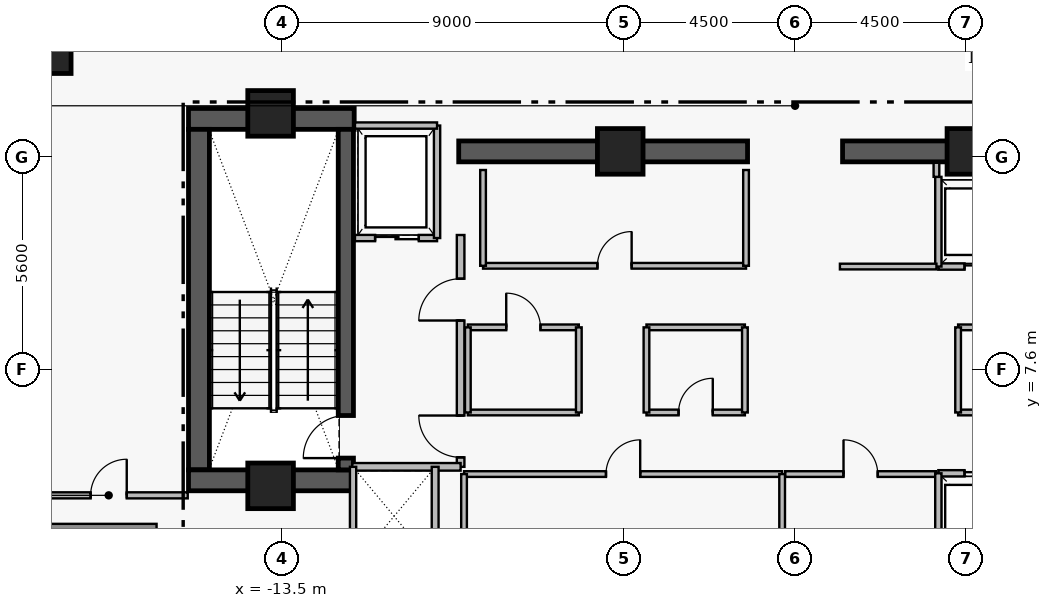
"""IFC4 building model, lengths in metres.
Left out: names, types, materials, properties, quantities, classifications, styles, units other than length and angle.
Written with IfcOpenShell. Run it as: python <this file> out.ifc"""

import sys

from ifc_helpers import new_model, si_unit, direction, frame, frame_2d, origin, origin_2d, place, context, subcontext, project, spatial, rectangle, extrude, element, fill, save


model = new_model("IFC4")
c1 = context("Model", 3, precision=1e-05, world=origin(), true_north=direction((0.0, 1.0)))
c2 = subcontext(c1, "Body", "Model", "MODEL_VIEW")
j1 = project(units=[si_unit("LENGTHUNIT", "METRE"), si_unit("PLANEANGLEUNIT", "RADIAN")], contexts=[c1])
p1 = place(None, origin())
s1 = spatial("IfcSite", under=j1, at=p1, CompositionType="ELEMENT")
p2 = place(p1, origin())
s2 = spatial("IfcBuilding", under=s1, at=p2, CompositionType="ELEMENT")
p3 = place(p2, frame((0.0, 0.0, 243.35)))
s3 = spatial("IfcBuildingStorey", under=s2, at=p3, CompositionType="ELEMENT", Elevation=243.35)
p4 = place(p3, frame((-15.96, 14.205, 0.0), z_axis=(0.0, 0.0, 1.0), x_axis=(1.0, 0.0, 0.0)))
e1 = element("IfcWall", 1, at=p4, inside=s3, PredefinedType="SHEAR", context=c2, shape_type="SweptSolid", body=[
    extrude(rectangle(XDim=4.36, YDim=0.55, at=frame_2d((2.18, 0.0))), origin(), (0.0, 0.0, 1.0), 3.51),
])
p5 = place(p3, frame((-15.685, 4.97, 0.0), z_axis=(0.0, 0.0, 1.0), x_axis=(0.0, 1.0, 0.0)))
e2 = element("IfcWall", 2, at=p5, inside=s3, PredefinedType="SHEAR", context=c2, shape_type="SweptSolid", body=[
    extrude(rectangle(XDim=8.96, YDim=0.55, at=frame_2d((4.48, 0.0))), origin(), (0.0, 0.0, 1.0), 3.51),
])
p6 = place(p3, frame((-15.96, 4.695, 0.0), z_axis=(0.0, 0.0, 1.0), x_axis=(1.0, 0.0, 0.0)))
e3 = element("IfcWall", 3, at=p6, inside=s3, PredefinedType="SHEAR", context=c2, shape_type="SweptSolid", body=[
    extrude(rectangle(XDim=4.36, YDim=0.55, at=frame_2d((2.18, 0.0))), origin(), (0.0, 0.0, 1.0), 3.51),
])
for number, where, z_axis, x_axis in (
    (4, (-8.85, 13.35, 0.0), (0.0, 0.0, 1.0), (1.0, 0.0, 0.0)),
    (5, (1.25, 13.35, 0.0), (0.0, 0.0, 1.0), (1.0, 0.0, 0.0)),
):
    element("IfcWall", number, at=place(p3, frame(where, z_axis=z_axis, x_axis=x_axis)), inside=s3, PredefinedType="SHEAR", context=c2, shape_type="SweptSolid", body=[
        extrude(rectangle(XDim=7.6, YDim=0.55, at=frame_2d((3.8, 0.0))), origin(), (0.0, 0.0, 1.0), 3.48),
    ])
p7 = place(p3, frame((-11.82, 4.97, 0.0), z_axis=(0.0, 0.0, 1.0), x_axis=(0.0, 1.0, 0.0)))
e6 = element("IfcWall", 6, at=p7, inside=s3, PredefinedType="SHEAR", context=c2, shape_type="SweptSolid", body=[
    extrude(rectangle(XDim=8.96, YDim=0.4, at=frame_2d((4.48, 0.0))), origin(), (0.0, 0.0, 1.0), 3.51),
])
p8 = place(p7, frame((0.31, 0.0, 0.0)))
e7 = element("IfcOpeningElement", 7, at=p8, cuts=e6, PredefinedType="OPENING", context=c2, shape_type="SweptSolid", body=[
    extrude(rectangle(XDim=1.12, YDim=2.22, at=frame_2d((0.56, 1.11))), frame((0.0, 0.21, 0.0), z_axis=(0.0, -1.0, 0.0), x_axis=(1.0, 0.0, 0.0)), (0.0, 0.0, 1.0), 0.42),
])
for number, where, z_axis, x_axis in (
    (8, (-13.8, 14.35, 0.0), (0.0, 0.0, 1.0), (1.0, 0.0, 0.0)),
    (9, (-4.6, 13.35, 0.0), (0.0, 0.0, 1.0), (1.0, 0.0, 0.0)),
    (10, (4.6, 13.35, 0.0), (0.0, 0.0, 1.0), (1.0, 0.0, 0.0)),
    (11, (-13.8, 4.55, 0.0), (0.0, 0.0, 1.0), (1.0, 0.0, 0.0)),
):
    element("IfcColumn", number, at=place(p3, frame(where, z_axis=z_axis, x_axis=x_axis)), inside=s3, PredefinedType="COLUMN", context=c2, shape_type="SweptSolid", body=[
        extrude(rectangle(XDim=1.2, YDim=1.2, at=origin_2d()), origin(), (0.0, 0.0, 1.0), 3.7),
    ])
p9 = place(p3, frame((-19.55, 15.9, 0.0), z_axis=(0.0, 0.0, 1.0), x_axis=(1.0, 0.0, 0.0)))
e12 = element("IfcColumn", 12, at=p9, inside=s3, PredefinedType="COLUMN", context=c2, shape_type="SweptSolid", body=[
    extrude(rectangle(XDim=1.0, YDim=1.0, at=origin_2d()), origin(), (0.0, 0.0, 1.0), 3.7),
])
p10 = place(p3, frame((-16.8, 3.4, 0.0), z_axis=(0.0, 0.0, 1.0), x_axis=(-1.0, 0.0, 0.0)))
e13 = element("IfcWall", 13, at=p10, inside=s3, PredefinedType="STANDARD", context=c2, shape_type="SweptSolid", body=[
    extrude(rectangle(XDim=3.4, YDim=0.3, at=frame_2d((1.7, 0.0))), origin(), (0.0, 0.0, 1.0), 3.48),
])
p11 = place(p3, frame((-8.8, 5.05, 0.0), z_axis=(0.0, 0.0, 1.0), x_axis=(0.0, 1.0, 0.0)))
e14 = element("IfcWall", 14, at=p11, inside=s3, PredefinedType="PARTITIONING", context=c2, shape_type="SweptSolid", body=[
    extrude(rectangle(XDim=6.1, YDim=0.2, at=frame_2d((3.05, 0.0))), origin(), (0.0, 0.0, 1.0), 3.48),
])
p12 = place(p11, frame((0.25, 0.0, 0.0)))
e15 = element("IfcOpeningElement", 15, at=p12, cuts=e14, PredefinedType="OPENING", context=c2, shape_type="SweptSolid", body=[
    extrude(rectangle(XDim=1.1, YDim=2.2, at=frame_2d((0.55, 1.1))), frame((0.0, 0.11, 0.0), z_axis=(0.0, -1.0, 0.0), x_axis=(1.0, 0.0, 0.0)), (0.0, 0.0, 1.0), 0.22),
])
p13 = place(p11, frame((3.85, 0.0, 0.0)))
e16 = element("IfcOpeningElement", 16, at=p13, cuts=e14, PredefinedType="OPENING", context=c2, shape_type="SweptSolid", body=[
    extrude(rectangle(XDim=1.1, YDim=2.2, at=frame_2d((0.55, 1.1))), frame((0.0, 0.11, 0.0), z_axis=(0.0, -1.0, 0.0), x_axis=(1.0, 0.0, 0.0)), (0.0, 0.0, 1.0), 0.22),
])
p14 = place(p3, frame((-11.58, 11.07, 0.0), z_axis=(0.0, 0.0, 1.0), x_axis=(1.0, 0.0, 0.0)))
e17 = element("IfcWall", 17, at=p14, inside=s3, PredefinedType="PARTITIONING", context=c2, shape_type="SweptSolid", body=[
    extrude(rectangle(XDim=2.16, YDim=0.165, at=frame_2d((1.08, 0.0))), origin(), (0.0, 0.0, 1.0), 3.48),
])
p15 = place(p14, frame((0.53, 0.0, 0.0)))
e18 = element("IfcOpeningElement", 18, at=p15, cuts=e17, PredefinedType="OPENING", context=c2, shape_type="SweptSolid", body=[
    extrude(rectangle(XDim=1.15, YDim=2.25, at=frame_2d((0.575, 1.125))), frame((0.0, 0.093, 0.0), z_axis=(0.0, -1.0, 0.0), x_axis=(1.0, 0.0, 0.0)), (0.0, 0.0, 1.0), 0.185),
])
p16 = place(p3, frame((3.77, 4.88, 0.0), z_axis=(0.0, 0.0, 1.0), x_axis=(1.0, 0.0, 0.0)))
e19 = element("IfcWall", 19, at=p16, inside=s3, PredefinedType="PARTITIONING", context=c2, shape_type="SweptSolid", body=[
    extrude(rectangle(XDim=2.48, YDim=0.165, at=frame_2d((1.24, 0.0))), origin(), (0.0, 0.0, 1.0), 3.48),
])
p17 = place(p16, frame((0.69, 0.0, 0.0)))
e20 = element("IfcOpeningElement", 20, at=p17, cuts=e19, PredefinedType="OPENING", context=c2, shape_type="SweptSolid", body=[
    extrude(rectangle(XDim=1.1, YDim=2.25, at=frame_2d((0.55, 1.125))), frame((0.0, 0.093, 0.0), z_axis=(0.0, -1.0, 0.0), x_axis=(1.0, 0.0, 0.0)), (0.0, 0.0, 1.0), 0.185),
])
p18 = place(p3, frame((3.77, 10.32, 0.0), z_axis=(0.0, 0.0, 1.0), x_axis=(1.0, 0.0, 0.0)))
e21 = element("IfcWall", 21, at=p18, inside=s3, PredefinedType="PARTITIONING", context=c2, shape_type="SweptSolid", body=[
    extrude(rectangle(XDim=2.48, YDim=0.165, at=frame_2d((1.24, 0.0))), origin(), (0.0, 0.0, 1.0), 3.48),
])
p19 = place(p18, frame((0.69, 0.0, 0.0)))
e22 = element("IfcOpeningElement", 22, at=p19, cuts=e21, PredefinedType="OPENING", context=c2, shape_type="SweptSolid", body=[
    extrude(rectangle(XDim=1.1, YDim=2.25, at=frame_2d((0.55, 1.125))), frame((0.0, 0.093, 0.0), z_axis=(0.0, -1.0, 0.0), x_axis=(1.0, 0.0, 0.0)), (0.0, 0.0, 1.0), 0.185),
])
p20 = place(p3, frame((-8.71, 4.86, 0.0), z_axis=(0.0, 0.0, 1.0), x_axis=(1.0, 0.0, 0.0)))
e23 = element("IfcWall", 23, at=p20, inside=s3, PredefinedType="PARTITIONING", context=c2, shape_type="SweptSolid", body=[
    extrude(rectangle(XDim=8.37, YDim=0.15, at=frame_2d((4.185, 0.0))), origin(), (0.0, 0.0, 1.0), 3.48),
])
p21 = place(p20, frame((3.735, 0.0, 0.0)))
e24 = element("IfcOpeningElement", 24, at=p21, cuts=e23, PredefinedType="OPENING", context=c2, shape_type="SweptSolid", body=[
    extrude(rectangle(XDim=0.9, YDim=2.15, at=frame_2d((0.45, 1.075))), frame((0.0, 0.085, 0.0), z_axis=(0.0, -1.0, 0.0), x_axis=(1.0, 0.0, 0.0)), (0.0, 0.0, 1.0), 0.17),
])
p22 = place(p3, frame((-0.26, 4.86, 0.0), z_axis=(0.0, 0.0, 1.0), x_axis=(1.0, 0.0, 0.0)))
e25 = element("IfcWall", 25, at=p22, inside=s3, PredefinedType="PARTITIONING", context=c2, shape_type="SweptSolid", body=[
    extrude(rectangle(XDim=3.97, YDim=0.15, at=frame_2d((1.985, 0.0))), origin(), (0.0, 0.0, 1.0), 3.48),
])
p23 = place(p22, frame((1.535, 0.0, 0.0)))
e26 = element("IfcOpeningElement", 26, at=p23, cuts=e25, PredefinedType="OPENING", context=c2, shape_type="SweptSolid", body=[
    extrude(rectangle(XDim=0.9, YDim=2.15, at=frame_2d((0.45, 1.075))), frame((0.0, 0.085, 0.0), z_axis=(0.0, -1.0, 0.0), x_axis=(1.0, 0.0, 0.0)), (0.0, 0.0, 1.0), 0.17),
])
p24 = place(p3, frame((-8.21, 10.34, 0.0), z_axis=(0.0, 0.0, 1.0), x_axis=(1.0, 0.0, 0.0)))
e27 = element("IfcWall", 27, at=p24, inside=s3, PredefinedType="PARTITIONING", context=c2, shape_type="SweptSolid", body=[
    extrude(rectangle(XDim=6.92, YDim=0.15, at=frame_2d((3.46, 0.0))), origin(), (0.0, 0.0, 1.0), 3.48),
])
p25 = place(p24, frame((3.01, 0.0, 0.0)))
e28 = element("IfcOpeningElement", 28, at=p25, cuts=e27, PredefinedType="OPENING", context=c2, shape_type="SweptSolid", body=[
    extrude(rectangle(XDim=0.9, YDim=2.15, at=frame_2d((0.45, 1.075))), frame((0.0, 0.085, 0.0), z_axis=(0.0, -1.0, 0.0), x_axis=(1.0, 0.0, 0.0)), (0.0, 0.0, 1.0), 0.17),
])
p26 = place(p3, frame((-8.61, 8.72, 0.0), z_axis=(0.0, 0.0, 1.0), x_axis=(1.0, 0.0, 0.0)))
e29 = element("IfcWall", 29, at=p26, inside=s3, PredefinedType="PARTITIONING", context=c2, shape_type="SweptSolid", body=[
    extrude(rectangle(XDim=2.92, YDim=0.15, at=frame_2d((1.46, 0.0))), origin(), (0.0, 0.0, 1.0), 3.48),
])
p27 = place(p26, frame((1.01, 0.0, 0.0)))
e30 = element("IfcOpeningElement", 30, at=p27, cuts=e29, PredefinedType="OPENING", context=c2, shape_type="SweptSolid", body=[
    extrude(rectangle(XDim=0.9, YDim=2.15, at=frame_2d((0.45, 1.075))), frame((0.0, 0.085, 0.0), z_axis=(0.0, -1.0, 0.0), x_axis=(1.0, 0.0, 0.0)), (0.0, 0.0, 1.0), 0.17),
])
p28 = place(p3, frame((-3.91, 6.48, 0.0), z_axis=(0.0, 0.0, 1.0), x_axis=(1.0, 0.0, 0.0)))
e31 = element("IfcWall", 31, at=p28, inside=s3, PredefinedType="PARTITIONING", context=c2, shape_type="SweptSolid", body=[
    extrude(rectangle(XDim=2.59, YDim=0.15, at=frame_2d((1.295, 0.0))), origin(), (0.0, 0.0, 1.0), 3.48),
])
p29 = place(p28, frame((0.845, 0.0, 0.0)))
e32 = element("IfcOpeningElement", 32, at=p29, cuts=e31, PredefinedType="OPENING", context=c2, shape_type="SweptSolid", body=[
    extrude(rectangle(XDim=0.9, YDim=2.15, at=frame_2d((0.45, 1.075))), frame((0.0, 0.085, 0.0), z_axis=(0.0, -1.0, 0.0), x_axis=(1.0, 0.0, 0.0)), (0.0, 0.0, 1.0), 0.17),
])
p30 = place(p3, frame((4.29, 6.48, 0.0), z_axis=(0.0, 0.0, 1.0), x_axis=(1.0, 0.0, 0.0)))
e33 = element("IfcWall", 33, at=p30, inside=s3, PredefinedType="PARTITIONING", context=c2, shape_type="SweptSolid", body=[
    extrude(rectangle(XDim=4.32, YDim=0.15, at=frame_2d((2.16, 0.0))), origin(), (0.0, 0.0, 1.0), 3.48),
])
p31 = place(p30, frame((1.71, 0.0, 0.0)))
e34 = element("IfcOpeningElement", 34, at=p31, cuts=e33, PredefinedType="OPENING", context=c2, shape_type="SweptSolid", body=[
    extrude(rectangle(XDim=0.9, YDim=2.15, at=frame_2d((0.45, 1.075))), frame((0.0, 0.085, 0.0), z_axis=(0.0, -1.0, 0.0), x_axis=(1.0, 0.0, 0.0)), (0.0, 0.0, 1.0), 0.17),
])
p32 = place(p3, frame((-20.14, 4.3, 0.0), z_axis=(0.0, 0.0, 1.0), x_axis=(1.0, 0.0, 0.0)))
e35 = element("IfcWall", 35, at=p32, inside=s3, PredefinedType="PARTITIONING", context=c2, shape_type="SweptSolid", body=[
    extrude(rectangle(XDim=4.16, YDim=0.16, at=frame_2d((2.08, 0.0))), origin(), (0.0, 0.0, 1.0), 3.48),
])
p33 = place(p32, frame((1.605, 0.0, 0.0)))
e36 = element("IfcOpeningElement", 36, at=p33, cuts=e35, PredefinedType="OPENING", context=c2, shape_type="SweptSolid", body=[
    extrude(rectangle(XDim=0.95, YDim=2.15, at=frame_2d((0.475, 1.075))), frame((0.0, 0.09, 0.0), z_axis=(0.0, -1.0, 0.0), x_axis=(1.0, 0.0, 0.0)), (0.0, 0.0, 1.0), 0.18),
])
p34 = place(p3, frame((-11.65, 5.05, 0.0), z_axis=(0.0, 0.0, 1.0), x_axis=(1.0, 0.0, 0.0)))
e37 = element("IfcWall", 37, at=p34, inside=s3, PredefinedType="PARTITIONING", context=c2, shape_type="SweptSolid", body=[
    extrude(rectangle(XDim=2.85, YDim=0.2, at=frame_2d((1.425, 0.0))), origin(), (0.0, 0.0, 1.0), 3.48),
])
p35 = place(p3, frame((-9.42, 11.07, 0.0), z_axis=(0.0, 0.0, 1.0), x_axis=(0.0, 1.0, 0.0)))
e38 = element("IfcWall", 38, at=p35, inside=s3, PredefinedType="PARTITIONING", context=c2, shape_type="SweptSolid", body=[
    extrude(rectangle(XDim=2.96, YDim=0.165, at=frame_2d((1.48, 0.0))), origin(), (0.0, 0.0, 1.0), 3.48),
])
p36 = place(p3, frame((-11.58, 14.03, 0.0), z_axis=(0.0, 0.0, 1.0), x_axis=(1.0, 0.0, 0.0)))
e39 = element("IfcWall", 39, at=p36, inside=s3, PredefinedType="PARTITIONING", context=c2, shape_type="SweptSolid", body=[
    extrude(rectangle(XDim=2.16, YDim=0.165, at=frame_2d((1.08, 0.0))), origin(), (0.0, 0.0, 1.0), 3.48),
])
for number, where, z_axis, x_axis in (
    (40, (3.77, 2.52, 0.0), (0.0, 0.0, 1.0), (0.0, 1.0, 0.0)),
    (41, (3.77, 10.32, 0.0), (0.0, 0.0, 1.0), (0.0, 1.0, 0.0)),
):
    element("IfcWall", number, at=place(p3, frame(where, z_axis=z_axis, x_axis=x_axis)), inside=s3, PredefinedType="PARTITIONING", context=c2, shape_type="SweptSolid", body=[
        extrude(rectangle(XDim=2.36, YDim=0.165, at=frame_2d((1.18, 0.0))), origin(), (0.0, 0.0, 1.0), 3.48),
    ])
for number, where, z_axis, x_axis in (
    (42, (-8.71, 2.49, 0.0), (0.0, 0.0, 1.0), (0.0, 1.0, 0.0)),
    (43, (-0.34, 2.49, 0.0), (0.0, 0.0, 1.0), (0.0, 1.0, 0.0)),
):
    element("IfcWall", number, at=place(p3, frame(where, z_axis=z_axis, x_axis=x_axis)), inside=s3, PredefinedType="PARTITIONING", context=c2, shape_type="SweptSolid", body=[
        extrude(rectangle(XDim=2.37, YDim=0.15, at=frame_2d((1.185, 0.0))), origin(), (0.0, 0.0, 1.0), 3.48),
    ])
for number, where, z_axis, x_axis in (
    (44, (-8.21, 10.34, 0.0), (0.0, 0.0, 1.0), (0.0, 1.0, 0.0)),
    (45, (-1.29, 10.34, 0.0), (0.0, 0.0, 1.0), (0.0, 1.0, 0.0)),
):
    element("IfcWall", number, at=place(p3, frame(where, z_axis=z_axis, x_axis=x_axis)), inside=s3, PredefinedType="PARTITIONING", context=c2, shape_type="SweptSolid", body=[
        extrude(rectangle(XDim=2.52, YDim=0.15, at=frame_2d((1.26, 0.0))), origin(), (0.0, 0.0, 1.0), 3.48),
    ])
p37 = place(p3, frame((-9.47, 2.45, 0.0), z_axis=(0.0, 0.0, 1.0), x_axis=(0.0, 1.0, 0.0)))
e46 = element("IfcWall", 46, at=p37, inside=s3, PredefinedType="PARTITIONING", context=c2, shape_type="SweptSolid", body=[
    extrude(rectangle(XDim=2.6, YDim=0.18, at=frame_2d((1.3, 0.0))), origin(), (0.0, 0.0, 1.0), 3.48),
])
p38 = place(p3, frame((-11.63, 2.47, 0.0), z_axis=(0.0, 0.0, 1.0), x_axis=(0.0, 1.0, 0.0)))
e47 = element("IfcWall", 47, at=p38, inside=s3, PredefinedType="PARTITIONING", context=c2, shape_type="SweptSolid", body=[
    extrude(rectangle(XDim=2.58, YDim=0.165, at=frame_2d((1.29, 0.0))), origin(), (0.0, 0.0, 1.0), 3.48),
])
p39 = place(p3, frame((-8.61, 6.48, 0.0), z_axis=(0.0, 0.0, 1.0), x_axis=(1.0, 0.0, 0.0)))
e48 = element("IfcWall", 48, at=p39, inside=s3, PredefinedType="PARTITIONING", context=c2, shape_type="SweptSolid", body=[
    extrude(rectangle(XDim=2.92, YDim=0.15, at=frame_2d((1.46, 0.0))), origin(), (0.0, 0.0, 1.0), 3.48),
])
for number, where, z_axis, x_axis in (
    (49, (-8.61, 6.48, 0.0), (0.0, 0.0, 1.0), (0.0, 1.0, 0.0)),
    (50, (-5.69, 6.48, 0.0), (0.0, 0.0, 1.0), (0.0, 1.0, 0.0)),
):
    element("IfcWall", number, at=place(p3, frame(where, z_axis=z_axis, x_axis=x_axis)), inside=s3, PredefinedType="PARTITIONING", context=c2, shape_type="SweptSolid", body=[
        extrude(rectangle(XDim=2.24, YDim=0.15, at=frame_2d((1.12, 0.0))), origin(), (0.0, 0.0, 1.0), 3.48),
    ])
p40 = place(p3, frame((-3.91, 8.72, 0.0), z_axis=(0.0, 0.0, 1.0), x_axis=(1.0, 0.0, 0.0)))
e51 = element("IfcWall", 51, at=p40, inside=s3, PredefinedType="PARTITIONING", context=c2, shape_type="SweptSolid", body=[
    extrude(rectangle(XDim=2.59, YDim=0.15, at=frame_2d((1.295, 0.0))), origin(), (0.0, 0.0, 1.0), 3.48),
])
for number, where, z_axis, x_axis in (
    (52, (-3.91, 6.48, 0.0), (0.0, 0.0, 1.0), (0.0, 1.0, 0.0)),
    (53, (-1.32, 6.48, 0.0), (0.0, 0.0, 1.0), (0.0, 1.0, 0.0)),
):
    element("IfcWall", number, at=place(p3, frame(where, z_axis=z_axis, x_axis=x_axis)), inside=s3, PredefinedType="PARTITIONING", context=c2, shape_type="SweptSolid", body=[
        extrude(rectangle(XDim=2.24, YDim=0.15, at=frame_2d((1.12, 0.0))), origin(), (0.0, 0.0, 1.0), 3.48),
    ])
p41 = place(p3, frame((4.29, 8.72, 0.0), z_axis=(0.0, 0.0, 1.0), x_axis=(1.0, 0.0, 0.0)))
e54 = element("IfcWall", 54, at=p41, inside=s3, PredefinedType="PARTITIONING", context=c2, shape_type="SweptSolid", body=[
    extrude(rectangle(XDim=4.32, YDim=0.15, at=frame_2d((2.16, 0.0))), origin(), (0.0, 0.0, 1.0), 3.48),
])
p42 = place(p3, frame((4.29, 6.48, 0.0), z_axis=(0.0, 0.0, 1.0), x_axis=(0.0, 1.0, 0.0)))
e55 = element("IfcWall", 55, at=p42, inside=s3, PredefinedType="PARTITIONING", context=c2, shape_type="SweptSolid", body=[
    extrude(rectangle(XDim=2.24, YDim=0.15, at=frame_2d((1.12, 0.0))), origin(), (0.0, 0.0, 1.0), 3.48),
])
p43 = place(p3, frame((1.18, 10.32, 0.0), z_axis=(0.0, 0.0, 1.0), x_axis=(1.0, 0.0, 0.0)))
e56 = element("IfcWall", 56, at=p43, inside=s3, PredefinedType="PARTITIONING", context=c2, shape_type="SweptSolid", body=[
    extrude(rectangle(XDim=2.54, YDim=0.15, at=frame_2d((1.27, 0.0))), origin(), (0.0, 0.0, 1.0), 3.48),
])
p44 = place(p3, frame((3.72, 12.68, 0.0), z_axis=(0.0, 0.0, 1.0), x_axis=(0.0, 1.0, 0.0)))
e57 = element("IfcWall", 57, at=p44, inside=s3, PredefinedType="PARTITIONING", context=c2, shape_type="SweptSolid", body=[
    extrude(rectangle(XDim=0.37, YDim=0.15, at=frame_2d((0.185, 0.0))), origin(), (0.0, 0.0, 1.0), 3.48),
])
p45 = place(p8, origin())
e58 = element("IfcDoor", 58, at=p45, inside=s3, OperationType="SINGLE_SWING_LEFT", PredefinedType="DOOR", context=c2, shape_type="SweptSolid", body=[
    extrude(rectangle(XDim=1.12, YDim=2.22, at=frame_2d((0.56, 1.11))), frame((0.0, 0.025, 0.0), z_axis=(0.0, -1.0, 0.0), x_axis=(1.0, 0.0, 0.0)), (0.0, 0.0, 1.0), 0.05),
])
fill(e7, e58)
p46 = place(p12, origin())
e59 = element("IfcDoor", 59, at=p46, inside=s3, OperationType="SINGLE_SWING_RIGHT", PredefinedType="DOOR", context=c2, shape_type="SweptSolid", body=[
    extrude(rectangle(XDim=1.1, YDim=2.2, at=frame_2d((0.55, 1.1))), frame((0.0, 0.025, 0.0), z_axis=(0.0, -1.0, 0.0), x_axis=(1.0, 0.0, 0.0)), (0.0, 0.0, 1.0), 0.05),
])
fill(e15, e59)
p47 = place(p13, origin())
e60 = element("IfcDoor", 60, at=p47, inside=s3, OperationType="SINGLE_SWING_LEFT", PredefinedType="DOOR", context=c2, shape_type="SweptSolid", body=[
    extrude(rectangle(XDim=1.1, YDim=2.2, at=frame_2d((0.55, 1.1))), frame((0.0, 0.025, 0.0), z_axis=(0.0, -1.0, 0.0), x_axis=(1.0, 0.0, 0.0)), (0.0, 0.0, 1.0), 0.05),
])
fill(e16, e60)
p48 = place(p15, origin())
e61 = element("IfcDoor", 61, at=p48, inside=s3, OperationType="SLIDING_TO_LEFT", PredefinedType="DOOR", context=c2, shape_type="SweptSolid", body=[
    extrude(rectangle(XDim=1.15, YDim=2.25, at=frame_2d((0.575, 1.125))), frame((0.0, 0.025, 0.0), z_axis=(0.0, -1.0, 0.0), x_axis=(1.0, 0.0, 0.0)), (0.0, 0.0, 1.0), 0.05),
])
fill(e18, e61)
p49 = place(p17, origin())
e62 = element("IfcDoor", 62, at=p49, inside=s3, OperationType="SLIDING_TO_LEFT", PredefinedType="DOOR", context=c2, shape_type="SweptSolid", body=[
    extrude(rectangle(XDim=1.1, YDim=2.25, at=frame_2d((0.55, 1.125))), frame((0.0, 0.025, 0.0), z_axis=(0.0, -1.0, 0.0), x_axis=(1.0, 0.0, 0.0)), (0.0, 0.0, 1.0), 0.05),
])
fill(e20, e62)
p50 = place(p19, origin())
e63 = element("IfcDoor", 63, at=p50, inside=s3, OperationType="SLIDING_TO_LEFT", PredefinedType="DOOR", context=c2, shape_type="SweptSolid", body=[
    extrude(rectangle(XDim=1.1, YDim=2.25, at=frame_2d((0.55, 1.125))), frame((0.0, 0.025, 0.0), z_axis=(0.0, -1.0, 0.0), x_axis=(1.0, 0.0, 0.0)), (0.0, 0.0, 1.0), 0.05),
])
fill(e22, e63)
p51 = place(p21, origin())
e64 = element("IfcDoor", 64, at=p51, inside=s3, OperationType="SINGLE_SWING_RIGHT", PredefinedType="DOOR", context=c2, shape_type="SweptSolid", body=[
    extrude(rectangle(XDim=0.9, YDim=2.15, at=frame_2d((0.45, 1.075))), frame((0.0, 0.025, 0.0), z_axis=(0.0, -1.0, 0.0), x_axis=(1.0, 0.0, 0.0)), (0.0, 0.0, 1.0), 0.05),
])
fill(e24, e64)
p52 = place(p23, origin())
e65 = element("IfcDoor", 65, at=p52, inside=s3, OperationType="SINGLE_SWING_LEFT", PredefinedType="DOOR", context=c2, shape_type="SweptSolid", body=[
    extrude(rectangle(XDim=0.9, YDim=2.15, at=frame_2d((0.45, 1.075))), frame((0.0, 0.025, 0.0), z_axis=(0.0, -1.0, 0.0), x_axis=(1.0, 0.0, 0.0)), (0.0, 0.0, 1.0), 0.05),
])
fill(e26, e65)
p53 = place(p25, origin())
e66 = element("IfcDoor", 66, at=p53, inside=s3, OperationType="SINGLE_SWING_RIGHT", PredefinedType="DOOR", context=c2, shape_type="SweptSolid", body=[
    extrude(rectangle(XDim=0.9, YDim=2.15, at=frame_2d((0.45, 1.075))), frame((0.0, 0.025, 0.0), z_axis=(0.0, -1.0, 0.0), x_axis=(1.0, 0.0, 0.0)), (0.0, 0.0, 1.0), 0.05),
])
fill(e28, e66)
p54 = place(p27, origin())
e67 = element("IfcDoor", 67, at=p54, inside=s3, OperationType="SINGLE_SWING_LEFT", PredefinedType="DOOR", context=c2, shape_type="SweptSolid", body=[
    extrude(rectangle(XDim=0.9, YDim=2.15, at=frame_2d((0.45, 1.075))), frame((0.0, 0.025, 0.0), z_axis=(0.0, -1.0, 0.0), x_axis=(1.0, 0.0, 0.0)), (0.0, 0.0, 1.0), 0.05),
])
fill(e30, e67)
p55 = place(p29, origin())
e68 = element("IfcDoor", 68, at=p55, inside=s3, OperationType="SINGLE_SWING_RIGHT", PredefinedType="DOOR", context=c2, shape_type="SweptSolid", body=[
    extrude(rectangle(XDim=0.9, YDim=2.15, at=frame_2d((0.45, 1.075))), frame((0.0, 0.025, 0.0), z_axis=(0.0, -1.0, 0.0), x_axis=(1.0, 0.0, 0.0)), (0.0, 0.0, 1.0), 0.05),
])
fill(e32, e68)
p56 = place(p33, origin())
e69 = element("IfcDoor", 69, at=p56, inside=s3, OperationType="SINGLE_SWING_RIGHT", PredefinedType="DOOR", context=c2, shape_type="SweptSolid", body=[
    extrude(rectangle(XDim=0.95, YDim=2.15, at=frame_2d((0.475, 1.075))), frame((0.0, 0.025, 0.0), z_axis=(0.0, -1.0, 0.0), x_axis=(1.0, 0.0, 0.0)), (0.0, 0.0, 1.0), 0.05),
])
fill(e36, e69)
save(model, sys.argv[1])
